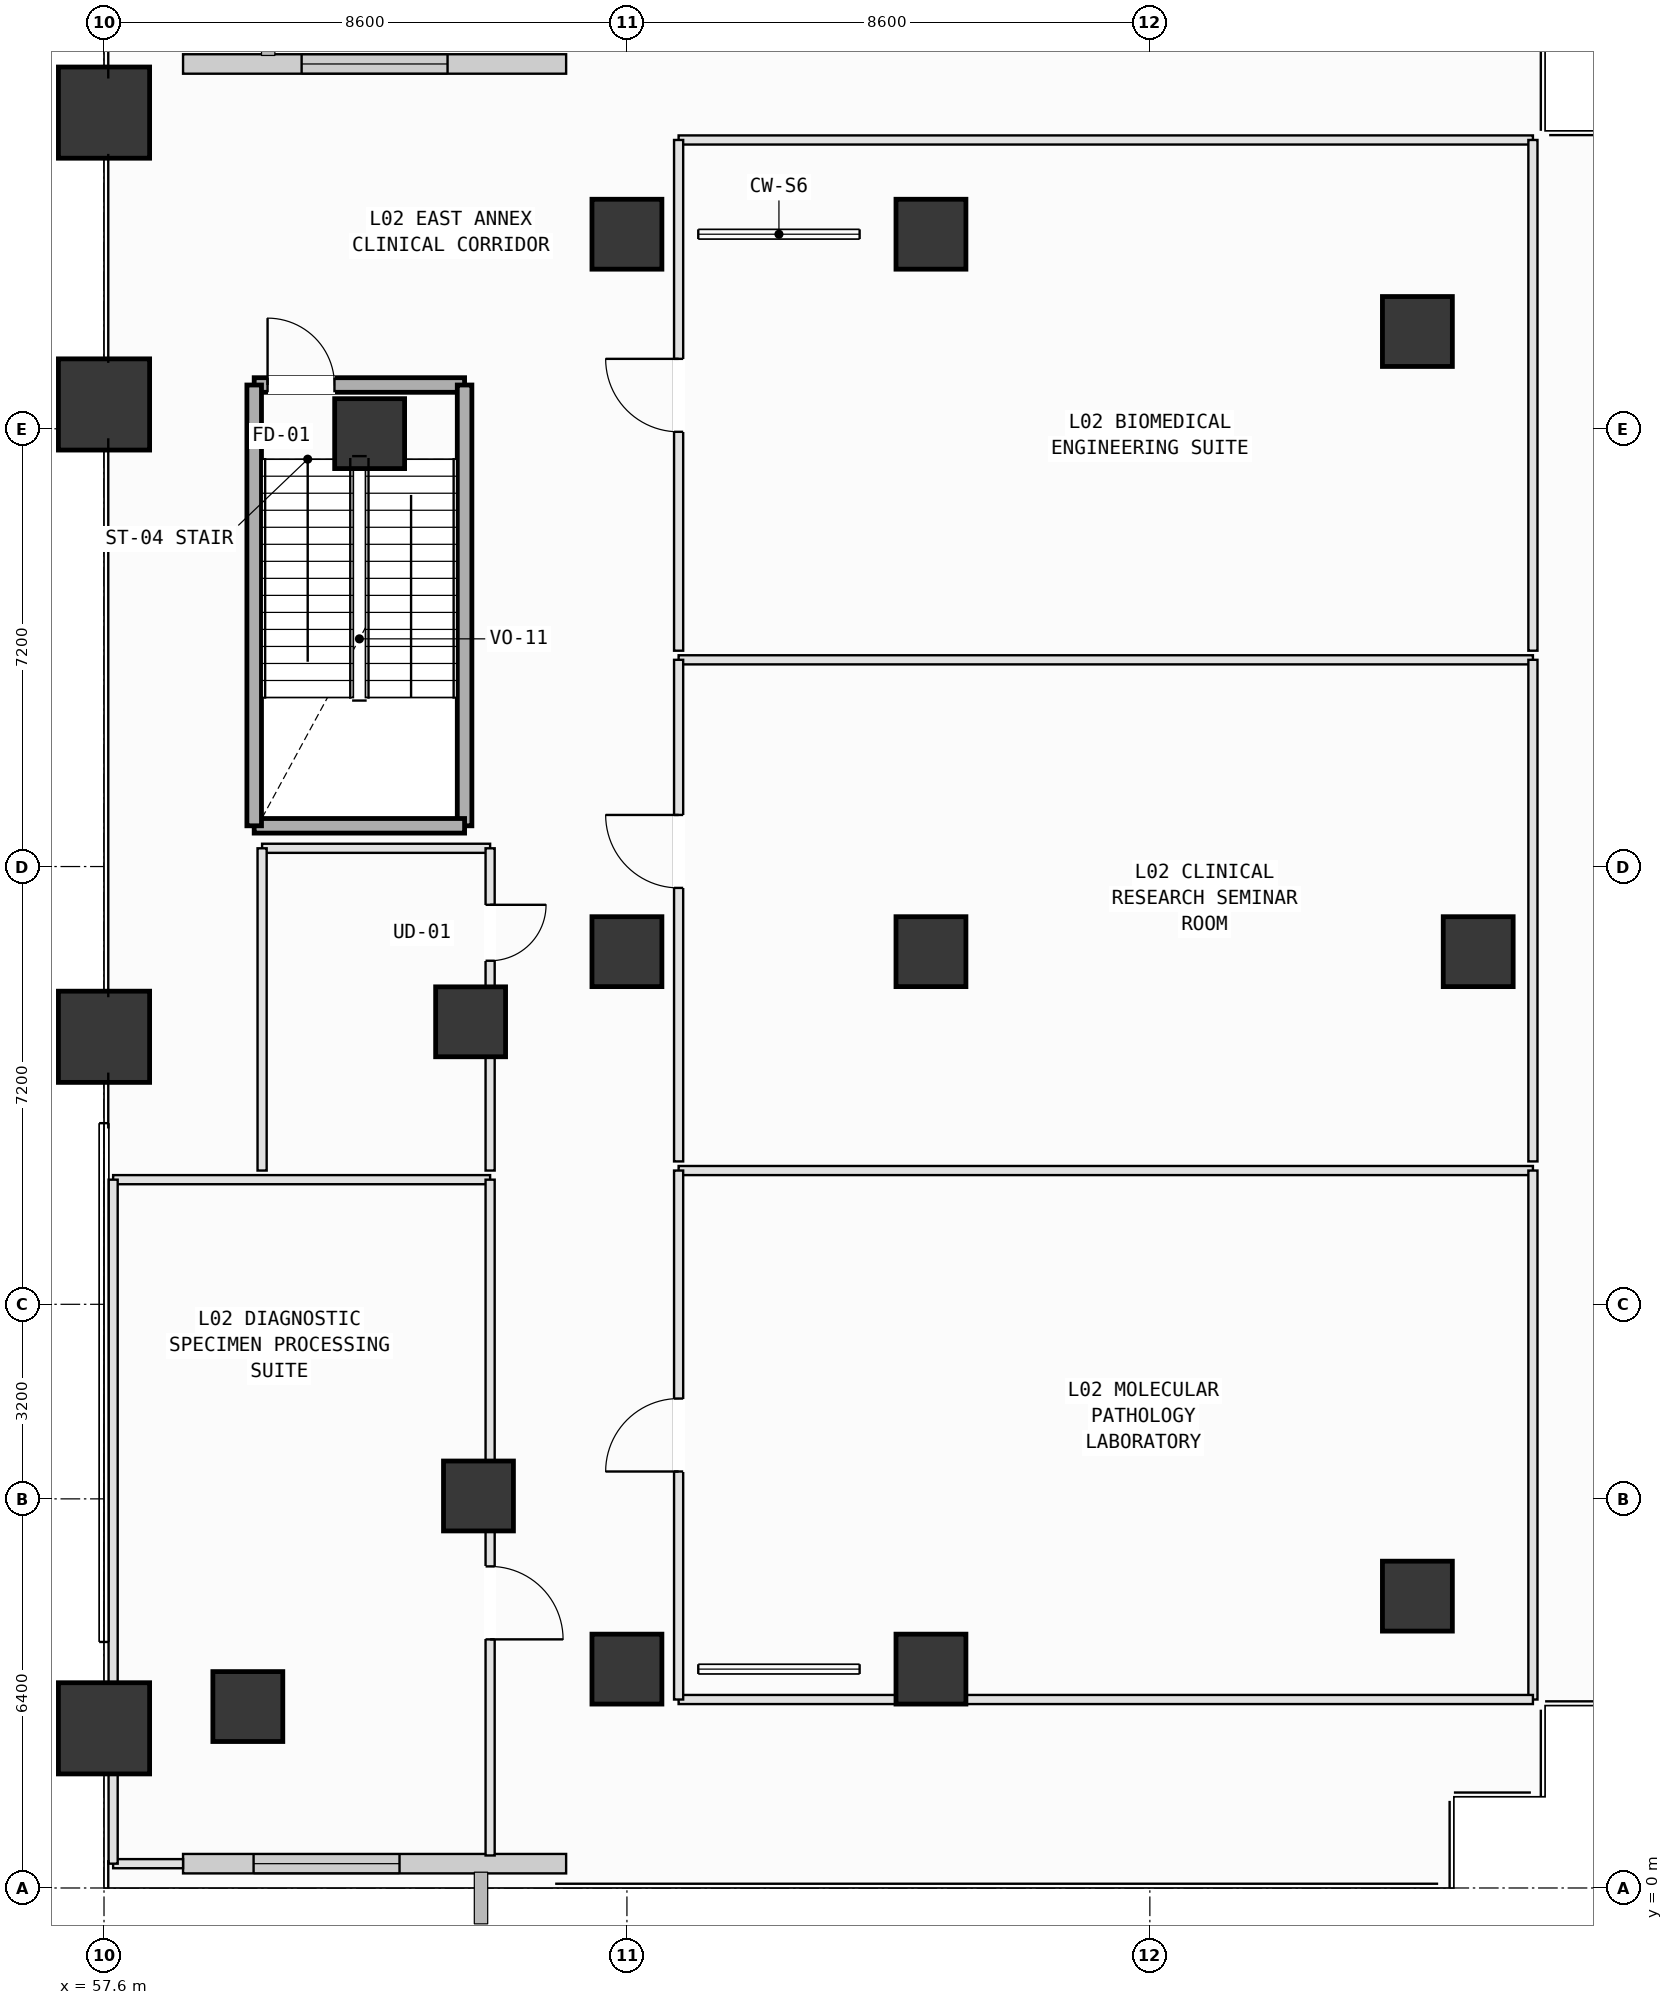
"""IFC4 building model, lengths in metres.
Left out: names, types, materials, properties, quantities, classifications, styles, units other than length and angle.
Written with IfcOpenShell. Run it as: python <this file> out.ifc"""

import sys

from ifc_helpers import new_model, si_unit, direction, frame, frame_2d, origin, origin_2d, place, context, subcontext, project, spatial, rectangle, extrude, element, fill, save


model = new_model("IFC4")
c1 = context("Model", 3, precision=1e-05, world=origin(), true_north=direction((0.0, 1.0)))
c2 = subcontext(c1, "Body", "Model", "MODEL_VIEW")
j1 = project(units=[si_unit("LENGTHUNIT", "METRE"), si_unit("PLANEANGLEUNIT", "RADIAN")], contexts=[c1])
p1 = place(None, origin())
s1 = spatial("IfcSite", under=j1, at=p1, CompositionType="ELEMENT")
p2 = place(p1, origin())
s2 = spatial("IfcBuilding", under=s1, at=p2, CompositionType="ELEMENT")
p3 = place(p2, frame((0.0, 0.0, 10.8)))
s3 = spatial("IfcBuildingStorey", under=s2, at=p3, CompositionType="ELEMENT", Elevation=10.8)
for number, where, z_axis, x_axis in (
    (1, (57.6, 2.626, 0.0), (0.0, 0.0, 1.0), (1.0, 0.0, 0.0)),
    (2, (57.6, 14.0, 0.0), (0.0, 0.0, 1.0), (1.0, 0.0, 0.0)),
    (3, (57.6, 24.4, 0.0), (0.0, 0.0, 1.0), (1.0, 0.0, 0.0)),
    (4, (57.6, 29.2, 0.0), (0.0, 0.0, 1.0), (1.0, 0.0, 0.0)),
):
    element("IfcColumn", number, at=place(p3, frame(where, z_axis=z_axis, x_axis=x_axis)), inside=s3, PredefinedType="PILASTER", context=c2, shape_type="SweptSolid", body=[
        extrude(rectangle(XDim=1.5, YDim=1.5, at=origin_2d()), origin(), (0.0, 0.0, 1.0), 5.4),
    ])
for number, where, z_axis, x_axis in (
    (5, (59.965, 2.984, 0.0), (0.0, 0.0, 1.0), (1.0, 0.0, 0.0)),
    (6, (63.758, 6.448, 0.0), (0.0, 0.0, 1.0), (1.0, 0.0, 0.0)),
    (7, (63.629, 14.246, 0.0), (0.0, 0.0, 1.0), (1.0, 0.0, 0.0)),
    (8, (61.969, 23.92, 0.0), (0.0, 0.0, 1.0), (1.0, 0.0, 0.0)),
    (9, (66.2, 3.6, 0.0), (0.0, 0.0, 1.0), (1.0, 0.0, 0.0)),
    (10, (71.2, 3.6, 0.0), (0.0, 0.0, 1.0), (1.0, 0.0, 0.0)),
    (11, (66.2, 15.4, 0.0), (0.0, 0.0, 1.0), (1.0, 0.0, 0.0)),
    (12, (71.2, 15.4, 0.0), (0.0, 0.0, 1.0), (1.0, 0.0, 0.0)),
    (13, (66.2, 27.2, 0.0), (0.0, 0.0, 1.0), (1.0, 0.0, 0.0)),
    (14, (71.2, 27.2, 0.0), (0.0, 0.0, 1.0), (1.0, 0.0, 0.0)),
    (15, (79.2, 4.8, 0.0), (0.0, 0.0, 1.0), (1.0, 0.0, 0.0)),
    (16, (80.2, 15.4, 0.0), (0.0, 0.0, 1.0), (1.0, 0.0, 0.0)),
    (17, (79.2, 25.6, 0.0), (0.0, 0.0, 1.0), (1.0, 0.0, 0.0)),
):
    element("IfcColumn", number, at=place(p3, frame(where, z_axis=z_axis, x_axis=x_axis)), inside=s3, PredefinedType="COLUMN", context=c2, shape_type="SweptSolid", body=[
        extrude(rectangle(XDim=1.15, YDim=1.15, at=origin_2d()), origin(), (0.0, 0.0, 1.0), 5.4),
    ])
p4 = place(p3, frame((65.2, 0.4, 0.0), z_axis=(0.0, 0.0, 1.0), x_axis=(-1.0, 0.0, 0.0)))
e18 = element("IfcWall", 18, at=p4, inside=s3, PredefinedType="SOLIDWALL", context=c2, shape_type="SweptSolid", body=[
    extrude(rectangle(XDim=6.3, YDim=0.32, at=frame_2d((3.15, 0.0))), origin(), (0.0, 0.0, 1.0), 4.23),
])
p5 = place(p4, frame((2.74, 0.0, 0.8)))
e19 = element("IfcOpeningElement", 19, at=p5, cuts=e18, PredefinedType="OPENING", context=c2, shape_type="SweptSolid", body=[
    extrude(rectangle(XDim=2.4, YDim=2.2, at=frame_2d((1.2, 1.1))), frame((0.0, 0.17, 0.0), z_axis=(0.0, -1.0, 0.0), x_axis=(1.0, 0.0, 0.0)), (0.0, 0.0, 1.0), 0.34),
])
p6 = place(p3, frame((58.9, 30.0, 0.0), z_axis=(0.0, 0.0, 1.0), x_axis=(1.0, 0.0, 0.0)))
e20 = element("IfcWall", 20, at=p6, inside=s3, PredefinedType="SOLIDWALL", context=c2, shape_type="SweptSolid", body=[
    extrude(rectangle(XDim=6.3, YDim=0.32, at=frame_2d((3.15, 0.0))), origin(), (0.0, 0.0, 1.0), 4.23),
])
p7 = place(p6, frame((1.95, 0.0, 0.8)))
e21 = element("IfcOpeningElement", 21, at=p7, cuts=e20, PredefinedType="OPENING", context=c2, shape_type="SweptSolid", body=[
    extrude(rectangle(XDim=2.4, YDim=2.2, at=frame_2d((1.2, 1.1))), frame((0.0, 0.17, 0.0), z_axis=(0.0, -1.0, 0.0), x_axis=(1.0, 0.0, 0.0)), (0.0, 0.0, 1.0), 0.34),
])
p8 = place(p3, frame((60.07, 24.72, 0.0), z_axis=(0.0, 0.0, 1.0), x_axis=(1.0, 0.0, 0.0)))
e22 = element("IfcWall", 22, at=p8, inside=s3, PredefinedType="SOLIDWALL", context=c2, shape_type="SweptSolid", body=[
    extrude(rectangle(XDim=3.46, YDim=0.24, at=frame_2d((1.73, 0.0))), origin(), (0.0, 0.0, 1.0), 5.15),
])
p9 = place(p8, frame((0.22, 0.0, 0.0)))
e23 = element("IfcOpeningElement", 23, at=p9, cuts=e22, PredefinedType="OPENING", context=c2, shape_type="SweptSolid", body=[
    extrude(rectangle(XDim=1.1, YDim=2.15, at=frame_2d((0.55, 1.075))), frame((0.0, 0.13, 0.0), z_axis=(0.0, -1.0, 0.0), x_axis=(1.0, 0.0, 0.0)), (0.0, 0.0, 1.0), 0.26),
])
p10 = place(p3, frame((63.53, 24.72, 0.0), z_axis=(0.0, 0.0, 1.0), x_axis=(0.0, -1.0, 0.0)))
e24 = element("IfcWall", 24, at=p10, inside=s3, PredefinedType="SOLIDWALL", context=c2, shape_type="SweptSolid", body=[
    extrude(rectangle(XDim=7.25, YDim=0.24, at=frame_2d((3.625, 0.0))), origin(), (0.0, 0.0, 1.0), 5.15),
])
p11 = place(p3, frame((63.53, 17.47, 0.0), z_axis=(0.0, 0.0, 1.0), x_axis=(-1.0, 0.0, 0.0)))
e25 = element("IfcWall", 25, at=p11, inside=s3, PredefinedType="SOLIDWALL", context=c2, shape_type="SweptSolid", body=[
    extrude(rectangle(XDim=3.46, YDim=0.24, at=frame_2d((1.73, 0.0))), origin(), (0.0, 0.0, 1.0), 5.15),
])
p12 = place(p3, frame((60.07, 17.47, 0.0), z_axis=(0.0, 0.0, 1.0), x_axis=(0.0, 1.0, 0.0)))
e26 = element("IfcWall", 26, at=p12, inside=s3, PredefinedType="SOLIDWALL", context=c2, shape_type="SweptSolid", body=[
    extrude(rectangle(XDim=7.25, YDim=0.24, at=frame_2d((3.625, 0.0))), origin(), (0.0, 0.0, 1.0), 5.15),
])
p13 = place(p3, frame((67.05, 11.8, 0.0), z_axis=(0.0, 0.0, 1.0), x_axis=(1.0, 0.0, 0.0)))
e27 = element("IfcWall", 27, at=p13, inside=s3, PredefinedType="PARTITIONING", context=c2, shape_type="SweptSolid", body=[
    extrude(rectangle(XDim=14.05, YDim=0.15, at=frame_2d((7.025, 0.0))), origin(), (0.0, 0.0, 1.0), 5.15),
])
p14 = place(p3, frame((81.1, 11.8, 0.0), z_axis=(0.0, 0.0, 1.0), x_axis=(0.0, -1.0, 0.0)))
e28 = element("IfcWall", 28, at=p14, inside=s3, PredefinedType="PARTITIONING", context=c2, shape_type="SweptSolid", body=[
    extrude(rectangle(XDim=8.7, YDim=0.15, at=frame_2d((4.35, 0.0))), origin(), (0.0, 0.0, 1.0), 5.15),
])
p15 = place(p3, frame((81.1, 3.1, 0.0), z_axis=(0.0, 0.0, 1.0), x_axis=(-1.0, 0.0, 0.0)))
e29 = element("IfcWall", 29, at=p15, inside=s3, PredefinedType="PARTITIONING", context=c2, shape_type="SweptSolid", body=[
    extrude(rectangle(XDim=14.05, YDim=0.15, at=frame_2d((7.025, 0.0))), origin(), (0.0, 0.0, 1.0), 4.235),
])
p16 = place(p3, frame((67.05, 3.1, 0.0), z_axis=(0.0, 0.0, 1.0), x_axis=(0.0, 1.0, 0.0)))
e30 = element("IfcWall", 30, at=p16, inside=s3, PredefinedType="PARTITIONING", context=c2, shape_type="SweptSolid", body=[
    extrude(rectangle(XDim=8.7, YDim=0.15, at=frame_2d((4.35, 0.0))), origin(), (0.0, 0.0, 1.0), 5.15),
])
p17 = place(p16, frame((3.75, 0.0, 0.0)))
e31 = element("IfcOpeningElement", 31, at=p17, cuts=e30, PredefinedType="OPENING", context=c2, shape_type="SweptSolid", body=[
    extrude(rectangle(XDim=1.2, YDim=2.15, at=frame_2d((0.6, 1.075))), frame((0.0, 0.085, 0.0), z_axis=(0.0, -1.0, 0.0), x_axis=(1.0, 0.0, 0.0)), (0.0, 0.0, 1.0), 0.17),
])
p18 = place(p3, frame((67.05, 20.2, 0.0), z_axis=(0.0, 0.0, 1.0), x_axis=(1.0, 0.0, 0.0)))
e32 = element("IfcWall", 32, at=p18, inside=s3, PredefinedType="PARTITIONING", context=c2, shape_type="SweptSolid", body=[
    extrude(rectangle(XDim=14.05, YDim=0.15, at=frame_2d((7.025, 0.0))), origin(), (0.0, 0.0, 1.0), 5.15),
])
p19 = place(p3, frame((81.1, 20.2, 0.0), z_axis=(0.0, 0.0, 1.0), x_axis=(0.0, -1.0, 0.0)))
e33 = element("IfcWall", 33, at=p19, inside=s3, PredefinedType="PARTITIONING", context=c2, shape_type="SweptSolid", body=[
    extrude(rectangle(XDim=8.25, YDim=0.15, at=frame_2d((4.125, 0.0))), origin(), (0.0, 0.0, 1.0), 5.15),
])
p20 = place(p3, frame((67.05, 11.95, 0.0), z_axis=(0.0, 0.0, 1.0), x_axis=(0.0, 1.0, 0.0)))
e34 = element("IfcWall", 34, at=p20, inside=s3, PredefinedType="PARTITIONING", context=c2, shape_type="SweptSolid", body=[
    extrude(rectangle(XDim=8.25, YDim=0.15, at=frame_2d((4.125, 0.0))), origin(), (0.0, 0.0, 1.0), 5.15),
])
p21 = place(p20, frame((4.499, 0.0, 0.0)))
e35 = element("IfcOpeningElement", 35, at=p21, cuts=e34, PredefinedType="OPENING", context=c2, shape_type="SweptSolid", body=[
    extrude(rectangle(XDim=1.2, YDim=2.15, at=frame_2d((0.6, 1.075))), frame((0.0, 0.085, 0.0), z_axis=(0.0, -1.0, 0.0), x_axis=(1.0, 0.0, 0.0)), (0.0, 0.0, 1.0), 0.17),
])
p22 = place(p3, frame((67.05, 28.75, 0.0), z_axis=(0.0, 0.0, 1.0), x_axis=(1.0, 0.0, 0.0)))
e36 = element("IfcWall", 36, at=p22, inside=s3, PredefinedType="PARTITIONING", context=c2, shape_type="SweptSolid", body=[
    extrude(rectangle(XDim=14.05, YDim=0.15, at=frame_2d((7.025, 0.0))), origin(), (0.0, 0.0, 1.0), 5.15),
])
p23 = place(p3, frame((81.1, 28.75, 0.0), z_axis=(0.0, 0.0, 1.0), x_axis=(0.0, -1.0, 0.0)))
e37 = element("IfcWall", 37, at=p23, inside=s3, PredefinedType="PARTITIONING", context=c2, shape_type="SweptSolid", body=[
    extrude(rectangle(XDim=8.4, YDim=0.15, at=frame_2d((4.2, 0.0))), origin(), (0.0, 0.0, 1.0), 5.15),
])
p24 = place(p3, frame((67.05, 20.35, 0.0), z_axis=(0.0, 0.0, 1.0), x_axis=(0.0, 1.0, 0.0)))
e38 = element("IfcWall", 38, at=p24, inside=s3, PredefinedType="PARTITIONING", context=c2, shape_type="SweptSolid", body=[
    extrude(rectangle(XDim=8.4, YDim=0.15, at=frame_2d((4.2, 0.0))), origin(), (0.0, 0.0, 1.0), 5.15),
])
p25 = place(p24, frame((3.6, 0.0, 0.0)))
e39 = element("IfcOpeningElement", 39, at=p25, cuts=e38, PredefinedType="OPENING", context=c2, shape_type="SweptSolid", body=[
    extrude(rectangle(XDim=1.2, YDim=2.15, at=frame_2d((0.6, 1.075))), frame((0.0, 0.085, 0.0), z_axis=(0.0, -1.0, 0.0), x_axis=(1.0, 0.0, 0.0)), (0.0, 0.0, 1.0), 0.17),
])
p26 = place(p3, frame((57.75, 11.65, 0.0), z_axis=(0.0, 0.0, 1.0), x_axis=(1.0, 0.0, 0.0)))
e40 = element("IfcWall", 40, at=p26, inside=s3, PredefinedType="PARTITIONING", context=c2, shape_type="SweptSolid", body=[
    extrude(rectangle(XDim=6.2, YDim=0.15, at=frame_2d((3.1, 0.0))), origin(), (0.0, 0.0, 1.0), 5.15),
])
p27 = place(p3, frame((63.95, 11.65, 0.0), z_axis=(0.0, 0.0, 1.0), x_axis=(0.0, -1.0, 0.0)))
e41 = element("IfcWall", 41, at=p27, inside=s3, PredefinedType="PARTITIONING", context=c2, shape_type="SweptSolid", body=[
    extrude(rectangle(XDim=11.115, YDim=0.15, at=frame_2d((5.558, 0.0))), origin(), (0.0, 0.0, 1.0), 4.235),
])
p28 = place(p27, frame((6.361, 0.0, 0.0)))
e42 = element("IfcOpeningElement", 42, at=p28, cuts=e41, PredefinedType="OPENING", context=c2, shape_type="SweptSolid", body=[
    extrude(rectangle(XDim=1.2, YDim=2.15, at=frame_2d((0.6, 1.075))), frame((0.0, 0.085, 0.0), z_axis=(0.0, -1.0, 0.0), x_axis=(1.0, 0.0, 0.0)), (0.0, 0.0, 1.0), 0.17),
])
p29 = place(p3, frame((58.9, 0.4, 0.0), z_axis=(0.0, 0.0, 1.0), x_axis=(-1.0, 0.0, 0.0)))
e43 = element("IfcWall", 43, at=p29, inside=s3, PredefinedType="PARTITIONING", context=c2, shape_type="SweptSolid", body=[
    extrude(rectangle(XDim=1.15, YDim=0.15, at=frame_2d((0.575, 0.0))), origin(), (0.0, 0.0, 1.0), 5.15),
])
p30 = place(p3, frame((57.75, 0.4, 0.0), z_axis=(0.0, 0.0, 1.0), x_axis=(0.0, 1.0, 0.0)))
e44 = element("IfcWall", 44, at=p30, inside=s3, PredefinedType="PARTITIONING", context=c2, shape_type="SweptSolid", body=[
    extrude(rectangle(XDim=11.25, YDim=0.15, at=frame_2d((5.625, 0.0))), origin(), (0.0, 0.0, 1.0), 4.235),
])
p31 = place(p3, frame((60.2, 17.1, 0.0), z_axis=(0.0, 0.0, 1.0), x_axis=(1.0, 0.0, 0.0)))
e45 = element("IfcWall", 45, at=p31, inside=s3, PredefinedType="PARTITIONING", context=c2, shape_type="SweptSolid", body=[
    extrude(rectangle(XDim=3.75, YDim=0.15, at=frame_2d((1.875, 0.0))), origin(), (0.0, 0.0, 1.0), 5.15),
])
p32 = place(p3, frame((63.95, 17.1, 0.0), z_axis=(0.0, 0.0, 1.0), x_axis=(0.0, -1.0, 0.0)))
e46 = element("IfcWall", 46, at=p32, inside=s3, PredefinedType="PARTITIONING", context=c2, shape_type="SweptSolid", body=[
    extrude(rectangle(XDim=5.3, YDim=0.15, at=frame_2d((2.65, 0.0))), origin(), (0.0, 0.0, 1.0), 4.235),
])
p33 = place(p32, frame((0.929, 0.0, 0.0)))
e47 = element("IfcOpeningElement", 47, at=p33, cuts=e46, PredefinedType="OPENING", context=c2, shape_type="SweptSolid", body=[
    extrude(rectangle(XDim=0.92, YDim=2.1, at=frame_2d((0.46, 1.05))), frame((0.0, 0.085, 0.0), z_axis=(0.0, -1.0, 0.0), x_axis=(1.0, 0.0, 0.0)), (0.0, 0.0, 1.0), 0.17),
])
p34 = place(p3, frame((60.2, 11.8, 0.0), z_axis=(0.0, 0.0, 1.0), x_axis=(0.0, 1.0, 0.0)))
e48 = element("IfcWall", 48, at=p34, inside=s3, PredefinedType="PARTITIONING", context=c2, shape_type="SweptSolid", body=[
    extrude(rectangle(XDim=5.3, YDim=0.15, at=frame_2d((2.65, 0.0))), origin(), (0.0, 0.0, 1.0), 5.15),
])
p35 = place(p5, origin())
e49 = element("IfcWindow", 49, at=p35, inside=s3, PartitioningType="SINGLE_PANEL", PredefinedType="WINDOW", context=c2, shape_type="SweptSolid", body=[
    extrude(rectangle(XDim=2.4, YDim=2.2, at=frame_2d((1.2, 1.1))), frame((0.0, 0.03, 0.0), z_axis=(0.0, -1.0, 0.0), x_axis=(1.0, 0.0, 0.0)), (0.0, 0.0, 1.0), 0.06),
])
fill(e19, e49)
p36 = place(p7, origin())
e50 = element("IfcWindow", 50, at=p36, inside=s3, PartitioningType="SINGLE_PANEL", PredefinedType="WINDOW", context=c2, shape_type="SweptSolid", body=[
    extrude(rectangle(XDim=2.4, YDim=2.2, at=frame_2d((1.2, 1.1))), frame((0.0, 0.03, 0.0), z_axis=(0.0, -1.0, 0.0), x_axis=(1.0, 0.0, 0.0)), (0.0, 0.0, 1.0), 0.06),
])
fill(e21, e50)
p37 = place(p9, origin())
e51 = element("IfcDoor", 51, at=p37, inside=s3, OperationType="SINGLE_SWING_LEFT", PredefinedType="DOOR", context=c2, shape_type="SweptSolid", body=[
    extrude(rectangle(XDim=1.1, YDim=2.15, at=frame_2d((0.55, 1.075))), frame((0.0, 0.025, 0.0), z_axis=(0.0, -1.0, 0.0), x_axis=(1.0, 0.0, 0.0)), (0.0, 0.0, 1.0), 0.05),
])
fill(e23, e51)
p38 = place(p17, origin())
e52 = element("IfcDoor", 52, at=p38, inside=s3, OperationType="SINGLE_SWING_LEFT", PredefinedType="DOOR", context=c2, shape_type="SweptSolid", body=[
    extrude(rectangle(XDim=1.2, YDim=2.15, at=frame_2d((0.6, 1.075))), frame((0.0, 0.025, 0.0), z_axis=(0.0, -1.0, 0.0), x_axis=(1.0, 0.0, 0.0)), (0.0, 0.0, 1.0), 0.05),
])
fill(e31, e52)
p39 = place(p21, origin())
e53 = element("IfcDoor", 53, at=p39, inside=s3, OperationType="SINGLE_SWING_RIGHT", PredefinedType="DOOR", context=c2, shape_type="SweptSolid", body=[
    extrude(rectangle(XDim=1.2, YDim=2.15, at=frame_2d((0.6, 1.075))), frame((0.0, 0.025, 0.0), z_axis=(0.0, -1.0, 0.0), x_axis=(1.0, 0.0, 0.0)), (0.0, 0.0, 1.0), 0.05),
])
fill(e35, e53)
p40 = place(p25, origin())
e54 = element("IfcDoor", 54, at=p40, inside=s3, OperationType="SINGLE_SWING_RIGHT", PredefinedType="DOOR", context=c2, shape_type="SweptSolid", body=[
    extrude(rectangle(XDim=1.2, YDim=2.15, at=frame_2d((0.6, 1.075))), frame((0.0, 0.025, 0.0), z_axis=(0.0, -1.0, 0.0), x_axis=(1.0, 0.0, 0.0)), (0.0, 0.0, 1.0), 0.05),
])
fill(e39, e54)
p41 = place(p28, origin())
e55 = element("IfcDoor", 55, at=p41, inside=s3, OperationType="SINGLE_SWING_RIGHT", PredefinedType="DOOR", context=c2, shape_type="SweptSolid", body=[
    extrude(rectangle(XDim=1.2, YDim=2.15, at=frame_2d((0.6, 1.075))), frame((0.0, 0.025, 0.0), z_axis=(0.0, -1.0, 0.0), x_axis=(1.0, 0.0, 0.0)), (0.0, 0.0, 1.0), 0.05),
])
fill(e42, e55)
p42 = place(p33, origin())
e56 = element("IfcDoor", 56, at=p42, inside=s3, OperationType="SINGLE_SWING_LEFT", PredefinedType="DOOR", context=c2, shape_type="SweptSolid", body=[
    extrude(rectangle(XDim=0.92, YDim=2.1, at=frame_2d((0.46, 1.05))), frame((0.0, 0.025, 0.0), z_axis=(0.0, -1.0, 0.0), x_axis=(1.0, 0.0, 0.0)), (0.0, 0.0, 1.0), 0.05),
])
fill(e47, e56)
save(model, sys.argv[1])
